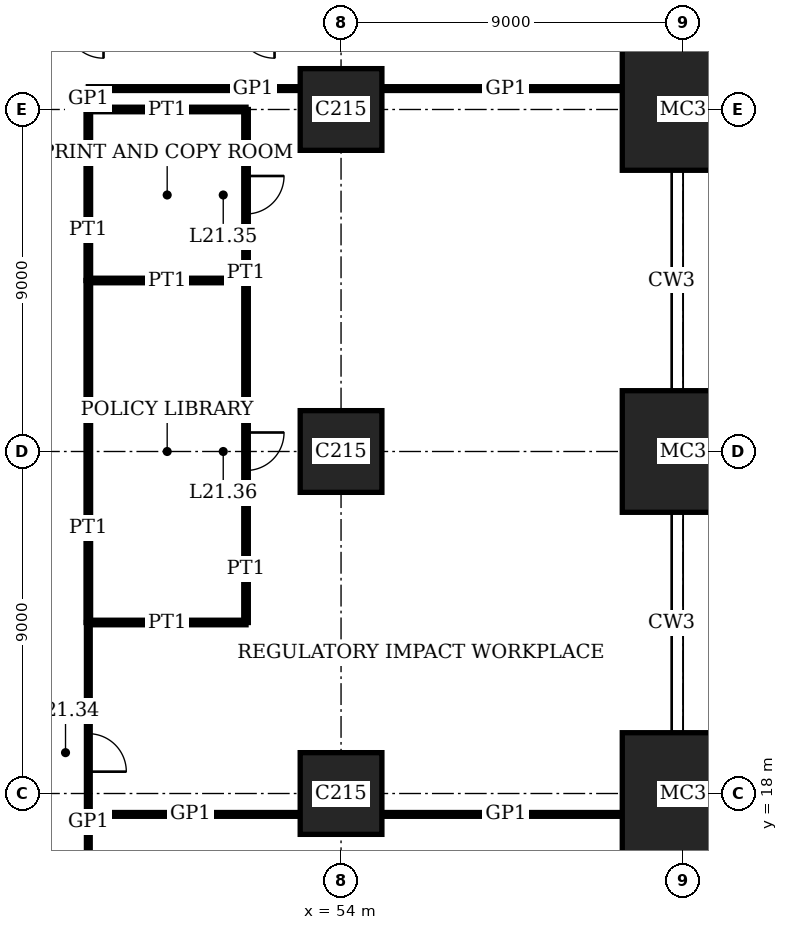
"""IFC4 building model, lengths in metres.
Left out: names, types, materials, properties, quantities, classifications, styles, units other than length and angle.
Written with IfcOpenShell. Run it as: python <this file> out.ifc"""

import sys

from ifc_helpers import new_model, si_unit, direction, frame, frame_2d, origin, origin_2d, place, context, subcontext, project, spatial, rectangle, extrude, element, fill, save


model = new_model("IFC4")
c1 = context("Model", 3, precision=1e-05, world=origin(), true_north=direction((0.0, 1.0)))
c2 = subcontext(c1, "Body", "Model", "MODEL_VIEW")
j1 = project(units=[si_unit("LENGTHUNIT", "METRE"), si_unit("PLANEANGLEUNIT", "RADIAN")], contexts=[c1])
p1 = place(None, origin())
s1 = spatial("IfcSite", under=j1, at=p1, CompositionType="ELEMENT")
p2 = place(p1, origin())
s2 = spatial("IfcBuilding", under=s1, at=p2, CompositionType="ELEMENT")
p3 = place(p2, frame((0.0, 0.0, 89.0)))
s3 = spatial("IfcBuildingStorey", under=s2, at=p3, CompositionType="ELEMENT", Elevation=89.0)
for number, where, z_axis, x_axis in (
    (1, (54.0, 18.0, 0.0), (0.0, 0.0, 1.0), (1.0, 0.0, 0.0)),
    (2, (54.0, 27.0, 0.0), (0.0, 0.0, 1.0), (1.0, 0.0, 0.0)),
    (3, (54.0, 36.0, 0.0), (0.0, 0.0, 1.0), (1.0, 0.0, 0.0)),
):
    element("IfcColumn", number, at=place(p3, frame(where, z_axis=z_axis, x_axis=x_axis)), inside=s3, PredefinedType="COLUMN", context=c2, shape_type="SweptSolid", body=[
        extrude(rectangle(XDim=2.15, YDim=2.15, at=origin_2d()), origin(), (0.0, 0.0, 1.0), 4.0),
    ])
for number, where, z_axis, x_axis in (
    (4, (63.0, 18.0, 0.0), (0.0, 0.0, 1.0), (1.0, 0.0, 0.0)),
    (5, (63.0, 27.0, 0.0), (0.0, 0.0, 1.0), (1.0, 0.0, 0.0)),
    (6, (63.0, 36.0, 0.0), (0.0, 0.0, 1.0), (1.0, 0.0, 0.0)),
):
    element("IfcColumn", number, at=place(p3, frame(where, z_axis=z_axis, x_axis=x_axis)), inside=s3, PredefinedType="COLUMN", context=c2, shape_type="SweptSolid", body=[
        extrude(rectangle(XDim=3.2, YDim=3.2, at=origin_2d()), origin(), (0.0, 0.0, 1.0), 4.0),
    ])
p4 = place(p3, frame((47.35, 17.45, 0.0), z_axis=(0.0, 0.0, 1.0), x_axis=(1.0, 0.0, 0.0)))
e7 = element("IfcWall", 7, at=p4, inside=s3, PredefinedType="PARTITIONING", context=c2, shape_type="SweptSolid", body=[
    extrude(rectangle(XDim=5.575, YDim=0.1, at=frame_2d((2.788, 0.0))), origin(), (0.0, 0.0, 1.0), 3.75),
])
p5 = place(p3, frame((55.075, 17.45, 0.0), z_axis=(0.0, 0.0, 1.0), x_axis=(1.0, 0.0, 0.0)))
e8 = element("IfcWall", 8, at=p5, inside=s3, PredefinedType="PARTITIONING", context=c2, shape_type="SweptSolid", body=[
    extrude(rectangle(XDim=6.325, YDim=0.1, at=frame_2d((3.163, 0.0))), origin(), (0.0, 0.0, 1.0), 3.75),
])
for number, where, z_axis, x_axis in (
    (9, (47.35, 22.5, 0.0), (0.0, 0.0, 1.0), (1.0, 0.0, 0.0)),
    (10, (47.35, 31.5, 0.0), (0.0, 0.0, 1.0), (1.0, 0.0, 0.0)),
):
    element("IfcWall", number, at=place(p3, frame(where, z_axis=z_axis, x_axis=x_axis)), inside=s3, PredefinedType="PARTITIONING", context=c2, shape_type="SweptSolid", body=[
        extrude(rectangle(XDim=4.15, YDim=0.12, at=frame_2d((2.075, 0.0))), origin(), (0.0, 0.0, 1.0), 3.1),
    ])
p6 = place(p3, frame((47.35, 36.0, 0.0), z_axis=(0.0, 0.0, 1.0), x_axis=(1.0, 0.0, 0.0)))
e11 = element("IfcWall", 11, at=p6, inside=s3, PredefinedType="PARTITIONING", context=c2, shape_type="SweptSolid", body=[
    extrude(rectangle(XDim=4.15, YDim=0.12, at=frame_2d((2.075, 0.0))), origin(), (0.0, 0.0, 1.0), 3.05),
])
p7 = place(p3, frame((47.35, 36.55, 0.0), z_axis=(0.0, 0.0, 1.0), x_axis=(1.0, 0.0, 0.0)))
e12 = element("IfcWall", 12, at=p7, inside=s3, PredefinedType="PARTITIONING", context=c2, shape_type="SweptSolid", body=[
    extrude(rectangle(XDim=5.575, YDim=0.1, at=frame_2d((2.788, 0.0))), origin(), (0.0, 0.0, 1.0), 3.75),
])
p8 = place(p3, frame((55.075, 36.55, 0.0), z_axis=(0.0, 0.0, 1.0), x_axis=(1.0, 0.0, 0.0)))
e13 = element("IfcWall", 13, at=p8, inside=s3, PredefinedType="PARTITIONING", context=c2, shape_type="SweptSolid", body=[
    extrude(rectangle(XDim=6.325, YDim=0.1, at=frame_2d((3.163, 0.0))), origin(), (0.0, 0.0, 1.0), 3.75),
])
p9 = place(p3, frame((47.35, 31.5, 0.0), z_axis=(0.0, 0.0, 1.0), x_axis=(0.0, 1.0, 0.0)))
e14 = element("IfcWall", 14, at=p9, inside=s3, PredefinedType="PARTITIONING", context=c2, shape_type="SweptSolid", body=[
    extrude(rectangle(XDim=4.5, YDim=0.12, at=frame_2d((2.25, 0.0))), origin(), (0.0, 0.0, 1.0), 3.75),
])
p10 = place(p3, frame((47.35, 22.5, 0.0), z_axis=(0.0, 0.0, 1.0), x_axis=(0.0, 1.0, 0.0)))
e15 = element("IfcWall", 15, at=p10, inside=s3, PredefinedType="PARTITIONING", context=c2, shape_type="SweptSolid", body=[
    extrude(rectangle(XDim=9.0, YDim=0.12, at=frame_2d((4.5, 0.0))), origin(), (0.0, 0.0, 1.0), 3.75),
])
p11 = place(p3, frame((47.35, 15.65, 0.0), z_axis=(0.0, 0.0, 1.0), x_axis=(0.0, 1.0, 0.0)))
e16 = element("IfcWall", 16, at=p11, inside=s3, PredefinedType="PARTITIONING", context=c2, shape_type="SweptSolid", body=[
    extrude(rectangle(XDim=6.85, YDim=0.1, at=frame_2d((3.425, 0.0))), origin(), (0.0, 0.0, 1.0), 3.75),
])
p12 = place(p11, frame((2.925, 0.0, 0.0)))
e17 = element("IfcOpeningElement", 17, at=p12, cuts=e16, PredefinedType="OPENING", context=c2, shape_type="SweptSolid", body=[
    extrude(rectangle(XDim=1.0, YDim=2.4, at=frame_2d((0.5, 1.2))), frame((0.0, 0.06, 0.0), z_axis=(0.0, -1.0, 0.0), x_axis=(1.0, 0.0, 0.0)), (0.0, 0.0, 1.0), 0.12),
])
p13 = place(p3, frame((47.35, 36.0, 0.0), z_axis=(0.0, 0.0, 1.0), x_axis=(0.0, 1.0, 0.0)))
e18 = element("IfcWall", 18, at=p13, inside=s3, PredefinedType="PARTITIONING", context=c2, shape_type="SweptSolid", body=[
    extrude(rectangle(XDim=0.55, YDim=0.1, at=frame_2d((0.275, 0.0))), origin(), (0.0, 0.0, 1.0), 3.75),
])
p14 = place(p3, frame((51.5, 31.5, 0.0), z_axis=(0.0, 0.0, 1.0), x_axis=(0.0, 1.0, 0.0)))
e19 = element("IfcWall", 19, at=p14, inside=s3, PredefinedType="PARTITIONING", context=c2, shape_type="SweptSolid", body=[
    extrude(rectangle(XDim=4.5, YDim=0.12, at=frame_2d((2.25, 0.0))), origin(), (0.0, 0.0, 1.0), 3.75),
])
p15 = place(p14, frame((1.75, 0.0, 0.0)))
e20 = element("IfcOpeningElement", 20, at=p15, cuts=e19, PredefinedType="OPENING", context=c2, shape_type="SweptSolid", body=[
    extrude(rectangle(XDim=1.0, YDim=2.4, at=frame_2d((0.5, 1.2))), frame((0.0, 0.07, 0.0), z_axis=(0.0, -1.0, 0.0), x_axis=(1.0, 0.0, 0.0)), (0.0, 0.0, 1.0), 0.14),
])
p16 = place(p3, frame((51.5, 22.5, 0.0), z_axis=(0.0, 0.0, 1.0), x_axis=(0.0, 1.0, 0.0)))
e21 = element("IfcWall", 21, at=p16, inside=s3, PredefinedType="PARTITIONING", context=c2, shape_type="SweptSolid", body=[
    extrude(rectangle(XDim=9.0, YDim=0.12, at=frame_2d((4.5, 0.0))), origin(), (0.0, 0.0, 1.0), 3.75),
])
p17 = place(p16, frame((4.0, 0.0, 0.0)))
e22 = element("IfcOpeningElement", 22, at=p17, cuts=e21, PredefinedType="OPENING", context=c2, shape_type="SweptSolid", body=[
    extrude(rectangle(XDim=1.0, YDim=2.4, at=frame_2d((0.5, 1.2))), frame((0.0, 0.07, 0.0), z_axis=(0.0, -1.0, 0.0), x_axis=(1.0, 0.0, 0.0)), (0.0, 0.0, 1.0), 0.14),
])
p18 = place(p12, origin())
e23 = element("IfcDoor", 23, at=p18, inside=s3, OperationType="SINGLE_SWING_LEFT", PredefinedType="DOOR", context=c2, shape_type="SweptSolid", body=[
    extrude(rectangle(XDim=1.0, YDim=2.4, at=frame_2d((0.5, 1.2))), frame((0.0, 0.02, 0.0), z_axis=(0.0, -1.0, 0.0), x_axis=(1.0, 0.0, 0.0)), (0.0, 0.0, 1.0), 0.04),
])
fill(e17, e23)
p19 = place(p15, origin())
e24 = element("IfcDoor", 24, at=p19, inside=s3, OperationType="SINGLE_SWING_RIGHT", PredefinedType="DOOR", context=c2, shape_type="SweptSolid", body=[
    extrude(rectangle(XDim=1.0, YDim=2.4, at=frame_2d((0.5, 1.2))), frame((0.0, 0.025, 0.0), z_axis=(0.0, -1.0, 0.0), x_axis=(1.0, 0.0, 0.0)), (0.0, 0.0, 1.0), 0.05),
])
fill(e20, e24)
p20 = place(p17, origin())
e25 = element("IfcDoor", 25, at=p20, inside=s3, OperationType="SINGLE_SWING_RIGHT", PredefinedType="DOOR", context=c2, shape_type="SweptSolid", body=[
    extrude(rectangle(XDim=1.0, YDim=2.4, at=frame_2d((0.5, 1.2))), frame((0.0, 0.025, 0.0), z_axis=(0.0, -1.0, 0.0), x_axis=(1.0, 0.0, 0.0)), (0.0, 0.0, 1.0), 0.05),
])
fill(e22, e25)
save(model, sys.argv[1])
